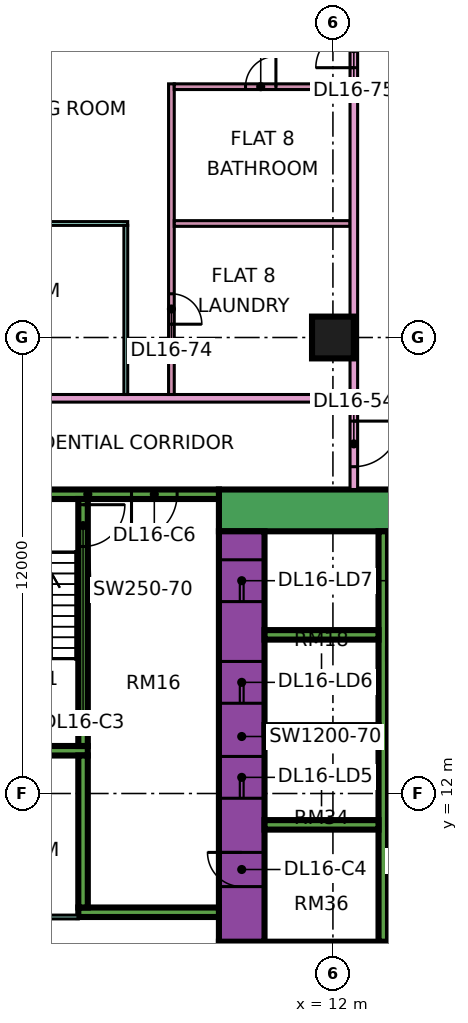
"""IFC4 building model, lengths in metres.
Left out: names, types, materials, properties, quantities, classifications, styles, units other than length and angle.
Written with IfcOpenShell. Run it as: python <this file> out.ifc"""

import sys

from ifc_helpers import new_model, si_unit, direction, frame, frame_2d, origin, origin_2d, place, context, subcontext, project, spatial, rectangle, extrude, element, fill, save


model = new_model("IFC4")
c1 = context("Model", 3, precision=1e-05, world=origin(), true_north=direction((0.0, 1.0)))
c2 = subcontext(c1, "Body", "Model", "MODEL_VIEW")
j1 = project(units=[si_unit("LENGTHUNIT", "METRE"), si_unit("PLANEANGLEUNIT", "RADIAN")], contexts=[c1])
p1 = place(None, origin())
s1 = spatial("IfcSite", under=j1, at=p1, CompositionType="ELEMENT")
p2 = place(p1, origin())
s2 = spatial("IfcBuilding", under=s1, at=p2, CompositionType="ELEMENT")
p3 = place(p2, frame((0.0, 0.0, 75.15)))
s3 = spatial("IfcBuildingStorey", under=s2, at=p3, CompositionType="ELEMENT", Elevation=75.15)
p4 = place(p3, frame((12.0, 24.0, 0.0), z_axis=(0.0, 0.0, 1.0), x_axis=(1.0, 0.0, 0.0)))
e1 = element("IfcColumn", 1, at=p4, inside=s3, PredefinedType="COLUMN", context=c2, shape_type="SweptSolid", body=[
    extrude(rectangle(XDim=1.1, YDim=1.1, at=origin_2d()), origin(), (0.0, 0.0, 1.0), 3.75),
])
p5 = place(p3, frame((9.0, 7.55, 0.0), z_axis=(0.0, 0.0, 1.0), x_axis=(1.0, 0.0, 0.0)))
e2 = element("IfcWall", 2, at=p5, inside=s3, PredefinedType="SHEAR", context=c2, shape_type="SweptSolid", body=[
    extrude(rectangle(XDim=25.0, YDim=1.1, at=frame_2d((12.5, 0.0))), origin(), (0.0, 0.0, 1.0), 3.75),
])
p6 = place(p3, frame((9.0, 19.45, 0.0), z_axis=(0.0, 0.0, 1.0), x_axis=(1.0, 0.0, 0.0)))
e3 = element("IfcWall", 3, at=p6, inside=s3, PredefinedType="SHEAR", context=c2, shape_type="SweptSolid", body=[
    extrude(rectangle(XDim=25.0, YDim=1.1, at=frame_2d((12.5, 0.0))), origin(), (0.0, 0.0, 1.0), 3.75),
])
p7 = place(p6, frame((19.1, 0.0, 0.0)))
e4 = element("IfcOpeningElement", 4, at=p7, cuts=e3, PredefinedType="OPENING", context=c2, shape_type="SweptSolid", body=[
    extrude(rectangle(XDim=1.8, YDim=2.4, at=frame_2d((0.9, 1.2))), frame((0.0, 0.56, 0.0), z_axis=(0.0, -1.0, 0.0), x_axis=(1.0, 0.0, 0.0)), (0.0, 0.0, 1.0), 1.12),
])
p8 = place(p3, frame((9.6, 8.1, 0.0), z_axis=(0.0, 0.0, 1.0), x_axis=(0.0, 1.0, 0.0)))
e5 = element("IfcWall", 5, at=p8, inside=s3, PredefinedType="SHEAR", context=c2, shape_type="SweptSolid", body=[
    extrude(rectangle(XDim=10.8, YDim=1.2, at=frame_2d((5.4, 0.0))), origin(), (0.0, 0.0, 1.0), 3.75),
])
p9 = place(p8, frame((3.775, 0.0, 0.0)))
e6 = element("IfcOpeningElement", 6, at=p9, cuts=e5, PredefinedType="OPENING", context=c2, shape_type="SweptSolid", body=[
    extrude(rectangle(XDim=1.1, YDim=2.2, at=frame_2d((0.55, 1.1))), frame((0.0, 0.61, 0.0), z_axis=(0.0, -1.0, 0.0), x_axis=(1.0, 0.0, 0.0)), (0.0, 0.0, 1.0), 1.22),
])
p10 = place(p8, frame((6.275, 0.0, 0.0)))
e7 = element("IfcOpeningElement", 7, at=p10, cuts=e5, PredefinedType="OPENING", context=c2, shape_type="SweptSolid", body=[
    extrude(rectangle(XDim=1.1, YDim=2.2, at=frame_2d((0.55, 1.1))), frame((0.0, 0.61, 0.0), z_axis=(0.0, -1.0, 0.0), x_axis=(1.0, 0.0, 0.0)), (0.0, 0.0, 1.0), 1.22),
])
p11 = place(p8, frame((8.95, 0.0, 0.0)))
e8 = element("IfcOpeningElement", 8, at=p11, cuts=e5, PredefinedType="OPENING", context=c2, shape_type="SweptSolid", body=[
    extrude(rectangle(XDim=1.1, YDim=2.2, at=frame_2d((0.55, 1.1))), frame((0.0, 0.61, 0.0), z_axis=(0.0, -1.0, 0.0), x_axis=(1.0, 0.0, 0.0)), (0.0, 0.0, 1.0), 1.22),
])
p12 = place(p8, frame((1.45, 0.0, 0.0)))
e9 = element("IfcOpeningElement", 9, at=p12, cuts=e5, PredefinedType="OPENING", context=c2, shape_type="SweptSolid", body=[
    extrude(rectangle(XDim=0.9, YDim=2.1, at=frame_2d((0.45, 1.05))), frame((0.0, 0.61, 0.0), z_axis=(0.0, -1.0, 0.0), x_axis=(1.0, 0.0, 0.0)), (0.0, 0.0, 1.0), 1.22),
])
p13 = place(p3, frame((13.325, 8.1, 0.0), z_axis=(0.0, 0.0, 1.0), x_axis=(0.0, 1.0, 0.0)))
e10 = element("IfcWall", 10, at=p13, inside=s3, PredefinedType="SHEAR", context=c2, shape_type="SweptSolid", body=[
    extrude(rectangle(XDim=10.8, YDim=0.25, at=frame_2d((5.4, 0.0))), origin(), (0.0, 0.0, 1.0), 3.75),
])
p14 = place(p3, frame((13.45, 11.325, 0.0), z_axis=(0.0, 0.0, 1.0), x_axis=(1.0, 0.0, 0.0)))
e11 = element("IfcWall", 11, at=p14, inside=s3, PredefinedType="SHEAR", context=c2, shape_type="SweptSolid", body=[
    extrude(rectangle(XDim=19.45, YDim=0.25, at=frame_2d((9.725, 0.0))), origin(), (0.0, 0.0, 1.0), 3.75),
])
p15 = place(p14, frame((0.65, 0.0, 0.0)))
e12 = element("IfcOpeningElement", 12, at=p15, cuts=e11, PredefinedType="OPENING", context=c2, shape_type="SweptSolid", body=[
    extrude(rectangle(XDim=1.2, YDim=2.2, at=frame_2d((0.6, 1.1))), frame((0.0, 0.135, 0.0), z_axis=(0.0, -1.0, 0.0), x_axis=(1.0, 0.0, 0.0)), (0.0, 0.0, 1.0), 0.27),
])
p16 = place(p14, frame((3.4, 0.0, 0.0)))
e13 = element("IfcOpeningElement", 13, at=p16, cuts=e11, PredefinedType="OPENING", context=c2, shape_type="SweptSolid", body=[
    extrude(rectangle(XDim=1.2, YDim=2.2, at=frame_2d((0.6, 1.1))), frame((0.0, 0.135, 0.0), z_axis=(0.0, -1.0, 0.0), x_axis=(1.0, 0.0, 0.0)), (0.0, 0.0, 1.0), 0.27),
])
p17 = place(p14, frame((6.15, 0.0, 0.0)))
e14 = element("IfcOpeningElement", 14, at=p17, cuts=e11, PredefinedType="OPENING", context=c2, shape_type="SweptSolid", body=[
    extrude(rectangle(XDim=1.2, YDim=2.2, at=frame_2d((0.6, 1.1))), frame((0.0, 0.135, 0.0), z_axis=(0.0, -1.0, 0.0), x_axis=(1.0, 0.0, 0.0)), (0.0, 0.0, 1.0), 0.27),
])
p18 = place(p14, frame((8.9, 0.0, 0.0)))
e15 = element("IfcOpeningElement", 15, at=p18, cuts=e11, PredefinedType="OPENING", context=c2, shape_type="SweptSolid", body=[
    extrude(rectangle(XDim=1.2, YDim=2.2, at=frame_2d((0.6, 1.1))), frame((0.0, 0.135, 0.0), z_axis=(0.0, -1.0, 0.0), x_axis=(1.0, 0.0, 0.0)), (0.0, 0.0, 1.0), 0.27),
])
p19 = place(p3, frame((13.45, 15.675, 0.0), z_axis=(0.0, 0.0, 1.0), x_axis=(1.0, 0.0, 0.0)))
e16 = element("IfcWall", 16, at=p19, inside=s3, PredefinedType="SHEAR", context=c2, shape_type="SweptSolid", body=[
    extrude(rectangle(XDim=13.75, YDim=0.25, at=frame_2d((6.875, 0.0))), origin(), (0.0, 0.0, 1.0), 3.75),
])
for number, where, z_axis, x_axis in (
    (17, (10.2, 11.175, 0.0), (0.0, 0.0, 1.0), (1.0, 0.0, 0.0)),
    (18, (10.2, 13.675, 0.0), (0.0, 0.0, 1.0), (1.0, 0.0, 0.0)),
    (19, (10.2, 16.175, 0.0), (0.0, 0.0, 1.0), (1.0, 0.0, 0.0)),
):
    element("IfcWall", number, at=place(p3, frame(where, z_axis=z_axis, x_axis=x_axis)), inside=s3, PredefinedType="SHEAR", context=c2, shape_type="SweptSolid", body=[
        extrude(rectangle(XDim=3.0, YDim=0.25, at=frame_2d((1.5, 0.0))), origin(), (0.0, 0.0, 1.0), 3.75),
    ])
p20 = place(p3, frame((2.1, 19.875, 0.0), z_axis=(0.0, 0.0, 1.0), x_axis=(1.0, 0.0, 0.0)))
e20 = element("IfcWall", 20, at=p20, inside=s3, PredefinedType="SHEAR", context=c2, shape_type="SweptSolid", body=[
    extrude(rectangle(XDim=6.9, YDim=0.25, at=frame_2d((3.45, 0.0))), origin(), (0.0, 0.0, 1.0), 3.75),
])
p21 = place(p20, frame((1.175, 0.0, 0.0)))
e21 = element("IfcOpeningElement", 21, at=p21, cuts=e20, PredefinedType="OPENING", context=c2, shape_type="SweptSolid", body=[
    extrude(rectangle(XDim=1.1, YDim=2.2, at=frame_2d((0.55, 1.1))), frame((0.0, 0.135, 0.0), z_axis=(0.0, -1.0, 0.0), x_axis=(1.0, 0.0, 0.0)), (0.0, 0.0, 1.0), 0.27),
])
p22 = place(p20, frame((4.6, 0.0, 0.0)))
e22 = element("IfcOpeningElement", 22, at=p22, cuts=e20, PredefinedType="OPENING", context=c2, shape_type="SweptSolid", body=[
    extrude(rectangle(XDim=1.2, YDim=2.2, at=frame_2d((0.6, 1.1))), frame((0.0, 0.135, 0.0), z_axis=(0.0, -1.0, 0.0), x_axis=(1.0, 0.0, 0.0)), (0.0, 0.0, 1.0), 0.27),
])
p23 = place(p3, frame((2.1, 13.125, 0.0), z_axis=(0.0, 0.0, 1.0), x_axis=(1.0, 0.0, 0.0)))
e23 = element("IfcWall", 23, at=p23, inside=s3, PredefinedType="SHEAR", context=c2, shape_type="SweptSolid", body=[
    extrude(rectangle(XDim=3.45, YDim=0.25, at=frame_2d((1.725, 0.0))), origin(), (0.0, 0.0, 1.0), 3.75),
])
p24 = place(p3, frame((5.425, 13.25, 0.0), z_axis=(0.0, 0.0, 1.0), x_axis=(0.0, 1.0, 0.0)))
e24 = element("IfcWall", 24, at=p24, inside=s3, PredefinedType="SHEAR", context=c2, shape_type="SweptSolid", body=[
    extrude(rectangle(XDim=6.5, YDim=0.25, at=frame_2d((3.25, 0.0))), origin(), (0.0, 0.0, 1.0), 3.75),
])
p25 = place(p24, frame((5.25, 0.0, 0.0)))
e25 = element("IfcOpeningElement", 25, at=p25, cuts=e24, PredefinedType="OPENING", context=c2, shape_type="SweptSolid", body=[
    extrude(rectangle(XDim=1.1, YDim=2.2, at=frame_2d((0.55, 1.1))), frame((0.0, 0.135, 0.0), z_axis=(0.0, -1.0, 0.0), x_axis=(1.0, 0.0, 0.0)), (0.0, 0.0, 1.0), 0.27),
])
p26 = place(p3, frame((5.3, 8.875, 0.0), z_axis=(0.0, 0.0, 1.0), x_axis=(1.0, 0.0, 0.0)))
e26 = element("IfcWall", 26, at=p26, inside=s3, PredefinedType="SHEAR", context=c2, shape_type="SweptSolid", body=[
    extrude(rectangle(XDim=3.7, YDim=0.25, at=frame_2d((1.85, 0.0))), origin(), (0.0, 0.0, 1.0), 3.75),
])
p27 = place(p3, frame((5.425, 9.0, 0.0), z_axis=(0.0, 0.0, 1.0), x_axis=(0.0, 1.0, 0.0)))
e27 = element("IfcWall", 27, at=p27, inside=s3, PredefinedType="SHEAR", context=c2, shape_type="SweptSolid", body=[
    extrude(rectangle(XDim=4.0, YDim=0.25, at=frame_2d((2.0, 0.0))), origin(), (0.0, 0.0, 1.0), 3.75),
])
p28 = place(p3, frame((-1.447, 12.553, 0.0), z_axis=(0.0, 0.0, 1.0), x_axis=(0.707106781187, -0.707106781187, 0.0)))
e28 = element("IfcWall", 28, at=p28, inside=s3, PredefinedType="SOLIDWALL", context=c2, shape_type="SweptSolid", body=[
    extrude(rectangle(XDim=19.799, YDim=0.15, at=frame_2d((9.899, 0.0))), origin(), (0.0, 0.0, 1.0), 3.35),
])
p29 = place(p28, frame((2.212, 0.0, 0.45)))
e29 = element("IfcOpeningElement", 29, at=p29, cuts=e28, PredefinedType="OPENING", context=c2, shape_type="SweptSolid", body=[
    extrude(rectangle(XDim=3.0, YDim=2.4, at=frame_2d((1.5, 1.2))), frame((0.0, 0.085, 0.0), z_axis=(0.0, -1.0, 0.0), x_axis=(1.0, 0.0, 0.0)), (0.0, 0.0, 1.0), 0.17),
])
p30 = place(p28, frame((10.216, 0.0, 0.45)))
e30 = element("IfcOpeningElement", 30, at=p30, cuts=e28, PredefinedType="OPENING", context=c2, shape_type="SweptSolid", body=[
    extrude(rectangle(XDim=3.0, YDim=2.4, at=frame_2d((1.5, 1.2))), frame((0.0, 0.085, 0.0), z_axis=(0.0, -1.0, 0.0), x_axis=(1.0, 0.0, 0.0)), (0.0, 0.0, 1.0), 0.17),
])
p31 = place(p3, frame((-1.35, 27.0, 0.0), z_axis=(0.0, 0.0, 1.0), x_axis=(1.0, 0.0, 0.0)))
e31 = element("IfcWall", 31, at=p31, inside=s3, PredefinedType="PARTITIONING", context=c2, shape_type="SweptSolid", body=[
    extrude(rectangle(XDim=7.95, YDim=0.1, at=frame_2d((3.975, 0.0))), origin(), (0.0, 0.0, 1.0), 3.35),
])
p32 = place(p31, frame((4.2, 0.0, 0.0)))
e32 = element("IfcOpeningElement", 32, at=p32, cuts=e31, PredefinedType="OPENING", context=c2, shape_type="SweptSolid", body=[
    extrude(rectangle(XDim=0.9, YDim=2.1, at=frame_2d((0.45, 1.05))), frame((0.0, 0.06, 0.0), z_axis=(0.0, -1.0, 0.0), x_axis=(1.0, 0.0, 0.0)), (0.0, 0.0, 1.0), 0.12),
])
p33 = place(p3, frame((0.074, 22.4, 0.0), z_axis=(0.0, 0.0, 1.0), x_axis=(1.0, 0.0, 0.0)))
e33 = element("IfcWall", 33, at=p33, inside=s3, PredefinedType="PARTITIONING", context=c2, shape_type="SweptSolid", body=[
    extrude(rectangle(XDim=12.376, YDim=0.2, at=frame_2d((6.188, 0.0))), origin(), (0.0, 0.0, 1.0), 3.35),
])
p34 = place(p3, frame((2.461, 8.75, 0.0), z_axis=(0.0, 0.0, 1.0), x_axis=(1.0, 0.0, 0.0)))
e34 = element("IfcWall", 34, at=p34, inside=s3, PredefinedType="PARTITIONING", context=c2, shape_type="SweptSolid", body=[
    extrude(rectangle(XDim=2.839, YDim=0.1, at=frame_2d((1.419, 0.0))), origin(), (0.0, 0.0, 1.0), 3.35),
])
p35 = place(p34, frame((0.889, 0.0, 0.0)))
e35 = element("IfcOpeningElement", 35, at=p35, cuts=e34, PredefinedType="OPENING", context=c2, shape_type="SweptSolid", body=[
    extrude(rectangle(XDim=0.9, YDim=2.1, at=frame_2d((0.45, 1.05))), frame((0.0, 0.06, 0.0), z_axis=(0.0, -1.0, 0.0), x_axis=(1.0, 0.0, 0.0)), (0.0, 0.0, 1.0), 0.12),
])
p36 = place(p3, frame((6.55, 22.5, 0.0), z_axis=(0.0, 0.0, 1.0), x_axis=(0.0, 1.0, 0.0)))
e36 = element("IfcWall", 36, at=p36, inside=s3, PredefinedType="PARTITIONING", context=c2, shape_type="SweptSolid", body=[
    extrude(rectangle(XDim=4.45, YDim=0.1, at=frame_2d((2.225, 0.0))), origin(), (0.0, 0.0, 1.0), 3.35),
])
p37 = place(p3, frame((7.75, 22.5, 0.0), z_axis=(0.0, 0.0, 1.0), x_axis=(0.0, 1.0, 0.0)))
e37 = element("IfcWall", 37, at=p37, inside=s3, PredefinedType="PARTITIONING", context=c2, shape_type="SweptSolid", body=[
    extrude(rectangle(XDim=8.175, YDim=0.15, at=frame_2d((4.087, 0.0))), origin(), (0.0, 0.0, 1.0), 3.35),
])
p38 = place(p37, frame((1.85, 0.0, 0.0)))
e38 = element("IfcOpeningElement", 38, at=p38, cuts=e37, PredefinedType="OPENING", context=c2, shape_type="SweptSolid", body=[
    extrude(rectangle(XDim=0.8, YDim=2.1, at=frame_2d((0.4, 1.05))), frame((0.0, 0.085, 0.0), z_axis=(0.0, -1.0, 0.0), x_axis=(1.0, 0.0, 0.0)), (0.0, 0.0, 1.0), 0.17),
])
p39 = place(p3, frame((7.825, 27.0, 0.0), z_axis=(0.0, 0.0, 1.0), x_axis=(1.0, 0.0, 0.0)))
e39 = element("IfcWall", 39, at=p39, inside=s3, PredefinedType="PARTITIONING", context=c2, shape_type="SweptSolid", body=[
    extrude(rectangle(XDim=4.625, YDim=0.15, at=frame_2d((2.312, 0.0))), origin(), (0.0, 0.0, 1.0), 3.35),
])
p40 = place(p3, frame((7.825, 30.6, 0.0), z_axis=(0.0, 0.0, 1.0), x_axis=(1.0, 0.0, 0.0)))
e40 = element("IfcWall", 40, at=p40, inside=s3, PredefinedType="PARTITIONING", context=c2, shape_type="SweptSolid", body=[
    extrude(rectangle(XDim=4.625, YDim=0.15, at=frame_2d((2.312, 0.0))), origin(), (0.0, 0.0, 1.0), 3.35),
])
p41 = place(p40, frame((1.875, 0.0, 0.0)))
e41 = element("IfcOpeningElement", 41, at=p41, cuts=e40, PredefinedType="OPENING", context=c2, shape_type="SweptSolid", body=[
    extrude(rectangle(XDim=0.8, YDim=2.1, at=frame_2d((0.4, 1.05))), frame((0.0, 0.085, 0.0), z_axis=(0.0, -1.0, 0.0), x_axis=(1.0, 0.0, 0.0)), (0.0, 0.0, 1.0), 0.17),
])
p42 = place(p3, frame((12.55, 20.0, 0.0), z_axis=(0.0, 0.0, 1.0), x_axis=(0.0, 1.0, 0.0)))
e42 = element("IfcWall", 42, at=p42, inside=s3, PredefinedType="PARTITIONING", context=c2, shape_type="SweptSolid", body=[
    extrude(rectangle(XDim=42.926, YDim=0.2, at=frame_2d((21.463, 0.0))), origin(), (0.0, 0.0, 1.0), 3.35),
])
p43 = place(p42, frame((17.1, 0.0, 0.0)))
e43 = element("IfcOpeningElement", 43, at=p43, cuts=e42, PredefinedType="OPENING", context=c2, shape_type="SweptSolid", body=[
    extrude(rectangle(XDim=1.0, YDim=2.1, at=frame_2d((0.5, 1.05))), frame((0.0, 0.11, 0.0), z_axis=(0.0, -1.0, 0.0), x_axis=(1.0, 0.0, 0.0)), (0.0, 0.0, 1.0), 0.22),
])
p44 = place(p42, frame((28.95, 0.0, 0.0)))
e44 = element("IfcOpeningElement", 44, at=p44, cuts=e42, PredefinedType="OPENING", context=c2, shape_type="SweptSolid", body=[
    extrude(rectangle(XDim=1.0, YDim=2.1, at=frame_2d((0.5, 1.05))), frame((0.0, 0.11, 0.0), z_axis=(0.0, -1.0, 0.0), x_axis=(1.0, 0.0, 0.0)), (0.0, 0.0, 1.0), 0.22),
])
p45 = place(p42, frame((0.6, 0.0, 0.0)))
e45 = element("IfcOpeningElement", 45, at=p45, cuts=e42, PredefinedType="OPENING", context=c2, shape_type="SweptSolid", body=[
    extrude(rectangle(XDim=1.2, YDim=2.1, at=frame_2d((0.6, 1.05))), frame((0.0, 0.11, 0.0), z_axis=(0.0, -1.0, 0.0), x_axis=(1.0, 0.0, 0.0)), (0.0, 0.0, 1.0), 0.22),
])
p46 = place(p42, frame((11.1, 0.0, 0.0)))
e46 = element("IfcOpeningElement", 46, at=p46, cuts=e42, PredefinedType="OPENING", context=c2, shape_type="SweptSolid", body=[
    extrude(rectangle(XDim=1.0, YDim=2.1, at=frame_2d((0.5, 1.05))), frame((0.0, 0.11, 0.0), z_axis=(0.0, -1.0, 0.0), x_axis=(1.0, 0.0, 0.0)), (0.0, 0.0, 1.0), 0.22),
])
p47 = place(p9, origin())
e47 = element("IfcDoor", 47, at=p47, inside=s3, OperationType="DOUBLE_DOOR_SLIDING", PredefinedType="DOOR", context=c2, shape_type="SweptSolid", body=[
    extrude(rectangle(XDim=1.1, YDim=2.2, at=frame_2d((0.55, 1.1))), frame((0.0, 0.025, 0.0), z_axis=(0.0, -1.0, 0.0), x_axis=(1.0, 0.0, 0.0)), (0.0, 0.0, 1.0), 0.05),
])
fill(e6, e47)
p48 = place(p10, origin())
e48 = element("IfcDoor", 48, at=p48, inside=s3, OperationType="DOUBLE_DOOR_SLIDING", PredefinedType="DOOR", context=c2, shape_type="SweptSolid", body=[
    extrude(rectangle(XDim=1.1, YDim=2.2, at=frame_2d((0.55, 1.1))), frame((0.0, 0.025, 0.0), z_axis=(0.0, -1.0, 0.0), x_axis=(1.0, 0.0, 0.0)), (0.0, 0.0, 1.0), 0.05),
])
fill(e7, e48)
p49 = place(p11, origin())
e49 = element("IfcDoor", 49, at=p49, inside=s3, OperationType="DOUBLE_DOOR_SLIDING", PredefinedType="DOOR", context=c2, shape_type="SweptSolid", body=[
    extrude(rectangle(XDim=1.1, YDim=2.2, at=frame_2d((0.55, 1.1))), frame((0.0, 0.025, 0.0), z_axis=(0.0, -1.0, 0.0), x_axis=(1.0, 0.0, 0.0)), (0.0, 0.0, 1.0), 0.05),
])
fill(e8, e49)
p50 = place(p25, origin())
e50 = element("IfcDoor", 50, at=p50, inside=s3, OperationType="SINGLE_SWING_RIGHT", PredefinedType="DOOR", context=c2, shape_type="SweptSolid", body=[
    extrude(rectangle(XDim=1.1, YDim=2.2, at=frame_2d((0.55, 1.1))), frame((0.0, 0.025, 0.0), z_axis=(0.0, -1.0, 0.0), x_axis=(1.0, 0.0, 0.0)), (0.0, 0.0, 1.0), 0.05),
])
fill(e25, e50)
p51 = place(p12, frame((0.9, 0.0, 0.0), z_axis=(0.0, 0.0, 1.0), x_axis=(-1.0, 0.0, 0.0)))
e51 = element("IfcDoor", 51, at=p51, inside=s3, OperationType="SINGLE_SWING_RIGHT", PredefinedType="DOOR", context=c2, shape_type="SweptSolid", body=[
    extrude(rectangle(XDim=0.9, YDim=2.1, at=frame_2d((0.45, 1.05))), frame((0.0, 0.025, 0.0), z_axis=(0.0, -1.0, 0.0), x_axis=(1.0, 0.0, 0.0)), (0.0, 0.0, 1.0), 0.05),
])
fill(e9, e51)
p52 = place(p22, frame((1.2, 0.0, 0.0), z_axis=(0.0, 0.0, 1.0), x_axis=(-1.0, 0.0, 0.0)))
e52 = element("IfcDoor", 52, at=p52, inside=s3, OperationType="SINGLE_SWING_LEFT", PredefinedType="DOOR", context=c2, shape_type="SweptSolid", body=[
    extrude(rectangle(XDim=1.2, YDim=2.2, at=frame_2d((0.6, 1.1))), frame((0.0, 0.025, 0.0), z_axis=(0.0, -1.0, 0.0), x_axis=(1.0, 0.0, 0.0)), (0.0, 0.0, 1.0), 0.05),
])
fill(e22, e52)
p53 = place(p45, origin())
e53 = element("IfcDoor", 53, at=p53, inside=s3, OperationType="SINGLE_SWING_RIGHT", PredefinedType="DOOR", context=c2, shape_type="SweptSolid", body=[
    extrude(rectangle(XDim=1.2, YDim=2.1, at=frame_2d((0.6, 1.05))), frame((0.0, 0.025, 0.0), z_axis=(0.0, -1.0, 0.0), x_axis=(1.0, 0.0, 0.0)), (0.0, 0.0, 1.0), 0.05),
])
fill(e45, e53)
p54 = place(p41, frame((0.8, 0.0, 0.0), z_axis=(0.0, 0.0, 1.0), x_axis=(-1.0, 0.0, 0.0)))
e54 = element("IfcDoor", 54, at=p54, inside=s3, OperationType="SINGLE_SWING_RIGHT", PredefinedType="DOOR", context=c2, shape_type="SweptSolid", body=[
    extrude(rectangle(XDim=0.8, YDim=2.1, at=frame_2d((0.4, 1.05))), frame((0.0, 0.025, 0.0), z_axis=(0.0, -1.0, 0.0), x_axis=(1.0, 0.0, 0.0)), (0.0, 0.0, 1.0), 0.05),
])
fill(e41, e54)
p55 = place(p38, frame((0.8, 0.0, 0.0), z_axis=(0.0, 0.0, 1.0), x_axis=(-1.0, 0.0, 0.0)))
e55 = element("IfcDoor", 55, at=p55, inside=s3, OperationType="SINGLE_SWING_LEFT", PredefinedType="DOOR", context=c2, shape_type="SweptSolid", body=[
    extrude(rectangle(XDim=0.8, YDim=2.1, at=frame_2d((0.4, 1.05))), frame((0.0, 0.025, 0.0), z_axis=(0.0, -1.0, 0.0), x_axis=(1.0, 0.0, 0.0)), (0.0, 0.0, 1.0), 0.05),
])
fill(e38, e55)
p56 = place(p46, origin())
e56 = element("IfcDoor", 56, at=p56, inside=s3, OperationType="SINGLE_SWING_LEFT", PredefinedType="DOOR", context=c2, shape_type="SweptSolid", body=[
    extrude(rectangle(XDim=1.0, YDim=2.1, at=frame_2d((0.5, 1.05))), frame((0.0, 0.025, 0.0), z_axis=(0.0, -1.0, 0.0), x_axis=(1.0, 0.0, 0.0)), (0.0, 0.0, 1.0), 0.05),
])
fill(e46, e56)
save(model, sys.argv[1])
